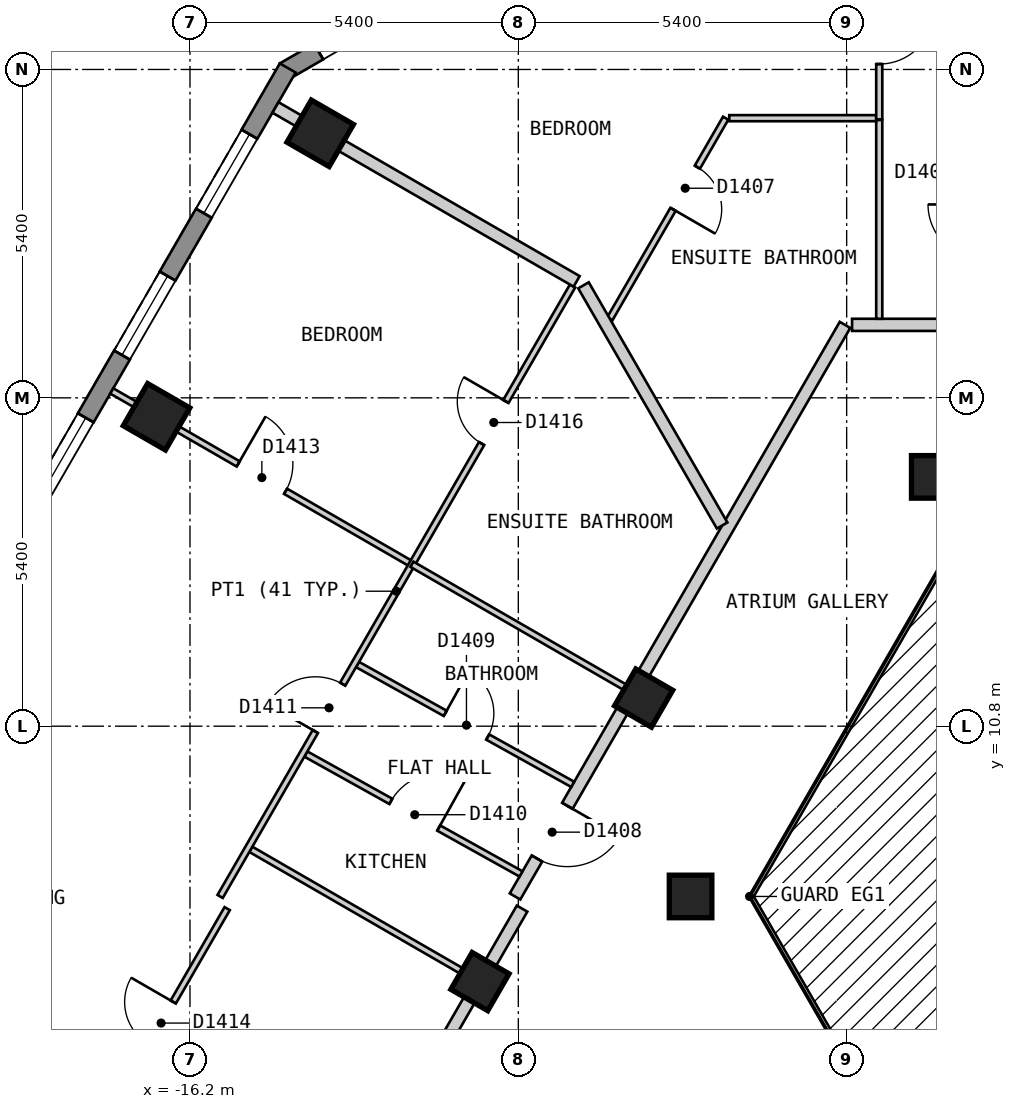
"""IFC4 building model, lengths in metres.
Left out: names, types, materials, properties, quantities, classifications, styles, units other than length and angle.
Written with IfcOpenShell. Run it as: python <this file> out.ifc"""

import sys

from ifc_helpers import new_model, si_unit, direction, frame, frame_2d, origin, origin_2d, place, context, subcontext, project, spatial, polyline, rectangle, outline, extrude, element, fill, save


model = new_model("IFC4")
c1 = context("Model", 3, precision=1e-05, world=origin(), true_north=direction((0.0, 1.0)))
c2 = subcontext(c1, "Body", "Model", "MODEL_VIEW")
j1 = project(units=[si_unit("LENGTHUNIT", "METRE"), si_unit("PLANEANGLEUNIT", "RADIAN")], contexts=[c1])
p1 = place(None, origin())
s1 = spatial("IfcSite", under=j1, at=p1, CompositionType="ELEMENT")
p2 = place(p1, origin())
s2 = spatial("IfcBuilding", under=s1, at=p2, CompositionType="ELEMENT")
p3 = place(p2, frame((0.0, 0.0, 166.2)))
s3 = spatial("IfcBuildingStorey", under=s2, at=p3, CompositionType="ELEMENT", Elevation=166.2)
for number, where, z_axis, x_axis in (
    (1, (-14.058, 20.55, 0.0), (0.0, 0.0, 1.0), (-0.5, -0.866, 0.0)),
    (2, (-16.75, 15.888, 0.0), (0.0, 0.0, 1.0), (-0.5, -0.866, 0.0)),
):
    element("IfcColumn", number, at=place(p3, frame(where, z_axis=z_axis, x_axis=x_axis)), inside=s3, PredefinedType="COLUMN", context=c2, shape_type="SweptSolid", body=[
        extrude(rectangle(XDim=0.8, YDim=0.8, at=origin_2d()), origin(), (0.0, 0.0, 1.0), 3.0),
    ])
for number, where, z_axis, x_axis in (
    (3, (-3.984, 14.9, 0.0), (0.0, 0.0, 1.0), (1.0, 0.0, 0.0)),
    (4, (-8.739, 11.263, 0.0), (0.0, 0.0, 1.0), (-0.5, -0.866, 0.0)),
    (5, (-7.967, 8.0, 0.0), (0.0, 0.0, 1.0), (1.0, 0.0, 0.0)),
    (6, (-11.431, 6.6, 0.0), (0.0, 0.0, 1.0), (-0.5, -0.866, 0.0)),
):
    element("IfcColumn", number, at=place(p3, frame(where, z_axis=z_axis, x_axis=x_axis)), inside=s3, PredefinedType="COLUMN", context=c2, shape_type="SweptSolid", body=[
        extrude(rectangle(XDim=0.7, YDim=0.7, at=origin_2d()), origin(), (0.0, 0.0, 1.0), 3.0),
    ])
p4 = place(p3, frame((-10.317, 24.07, 0.0), z_axis=(0.0, 0.0, 1.0), x_axis=(-0.866022959057, -0.500004234368, 0.0)))
e7 = element("IfcWall", 7, at=p4, inside=s3, PredefinedType="SOLIDWALL", context=c2, shape_type="SweptSolid", body=[
    extrude(outline(polyline([(0.0, -0.15), (5.0, -0.15), (4.92, 0.15), (0.08, 0.15), (0.0, -0.15)])), origin(), (0.0, 0.0, 1.0), 2.7),
])
p5 = place(p4, frame((0.65, 0.0, 0.15)))
e8 = element("IfcOpeningElement", 8, at=p5, cuts=e7, PredefinedType="OPENING", context=c2, shape_type="SweptSolid", body=[
    extrude(rectangle(XDim=1.2, YDim=2.1, at=frame_2d((0.6, 1.05))), frame((0.0, 0.16, 0.0), z_axis=(0.0, -1.0, 0.0), x_axis=(1.0, 0.0, 0.0)), (0.0, 0.0, 1.0), 0.32),
])
p6 = place(p4, frame((3.149, 0.0, 0.15)))
e9 = element("IfcOpeningElement", 9, at=p6, cuts=e7, PredefinedType="OPENING", context=c2, shape_type="SweptSolid", body=[
    extrude(rectangle(XDim=1.2, YDim=2.1, at=frame_2d((0.6, 1.05))), frame((0.0, 0.16, 0.0), z_axis=(0.0, -1.0, 0.0), x_axis=(1.0, 0.0, 0.0)), (0.0, 0.0, 1.0), 0.32),
])
p7 = place(p3, frame((-14.592, 21.625, 0.0), z_axis=(0.0, 0.0, 1.0), x_axis=(-0.500010537973, -0.866019319597, 0.0)))
e10 = element("IfcWall", 10, at=p7, inside=s3, PredefinedType="SOLIDWALL", context=c2, shape_type="SweptSolid", body=[
    extrude(outline(polyline([(0.0, -0.15), (22.863, -0.15), (22.783, 0.15), (0.08, 0.15), (0.0, -0.15)])), origin(), (0.0, 0.0, 1.0), 2.7),
])
p8 = place(p7, frame((1.259, 0.0, 0.15)))
e11 = element("IfcOpeningElement", 11, at=p8, cuts=e10, PredefinedType="OPENING", context=c2, shape_type="SweptSolid", body=[
    extrude(rectangle(XDim=1.5, YDim=2.1, at=frame_2d((0.75, 1.05))), frame((0.0, 0.16, 0.0), z_axis=(0.0, -1.0, 0.0), x_axis=(1.0, 0.0, 0.0)), (0.0, 0.0, 1.0), 0.32),
])
p9 = place(p7, frame((3.952, 0.0, 0.15)))
e12 = element("IfcOpeningElement", 12, at=p9, cuts=e10, PredefinedType="OPENING", context=c2, shape_type="SweptSolid", body=[
    extrude(rectangle(XDim=1.5, YDim=2.1, at=frame_2d((0.75, 1.05))), frame((0.0, 0.16, 0.0), z_axis=(0.0, -1.0, 0.0), x_axis=(1.0, 0.0, 0.0)), (0.0, 0.0, 1.0), 0.32),
])
p10 = place(p7, frame((6.644, 0.0, 0.15)))
e13 = element("IfcOpeningElement", 13, at=p10, cuts=e10, PredefinedType="OPENING", context=c2, shape_type="SweptSolid", body=[
    extrude(rectangle(XDim=1.5, YDim=2.1, at=frame_2d((0.75, 1.05))), frame((0.0, 0.16, 0.0), z_axis=(0.0, -1.0, 0.0), x_axis=(1.0, 0.0, 0.0)), (0.0, 0.0, 1.0), 0.32),
])
p11 = place(p7, frame((9.335, 0.0, 0.15)))
e14 = element("IfcOpeningElement", 14, at=p11, cuts=e10, PredefinedType="OPENING", context=c2, shape_type="SweptSolid", body=[
    extrude(rectangle(XDim=1.5, YDim=2.1, at=frame_2d((0.75, 1.05))), frame((0.0, 0.16, 0.0), z_axis=(0.0, -1.0, 0.0), x_axis=(1.0, 0.0, 0.0)), (0.0, 0.0, 1.0), 0.32),
])
p12 = place(p7, frame((12.028, 0.0, 0.15)))
e15 = element("IfcOpeningElement", 15, at=p12, cuts=e10, PredefinedType="OPENING", context=c2, shape_type="SweptSolid", body=[
    extrude(rectangle(XDim=1.5, YDim=2.1, at=frame_2d((0.75, 1.05))), frame((0.0, 0.16, 0.0), z_axis=(0.0, -1.0, 0.0), x_axis=(1.0, 0.0, 0.0)), (0.0, 0.0, 1.0), 0.32),
])
p13 = place(p7, frame((14.72, 0.0, 0.15)))
e16 = element("IfcOpeningElement", 16, at=p13, cuts=e10, PredefinedType="OPENING", context=c2, shape_type="SweptSolid", body=[
    extrude(rectangle(XDim=1.5, YDim=2.1, at=frame_2d((0.75, 1.05))), frame((0.0, 0.16, 0.0), z_axis=(0.0, -1.0, 0.0), x_axis=(1.0, 0.0, 0.0)), (0.0, 0.0, 1.0), 0.32),
])
p14 = place(p7, frame((17.411, 0.0, 0.15)))
e17 = element("IfcOpeningElement", 17, at=p14, cuts=e10, PredefinedType="OPENING", context=c2, shape_type="SweptSolid", body=[
    extrude(rectangle(XDim=1.5, YDim=2.1, at=frame_2d((0.75, 1.05))), frame((0.0, 0.16, 0.0), z_axis=(0.0, -1.0, 0.0), x_axis=(1.0, 0.0, 0.0)), (0.0, 0.0, 1.0), 0.32),
])
p15 = place(p7, frame((20.104, 0.0, 0.15)))
e18 = element("IfcOpeningElement", 18, at=p15, cuts=e10, PredefinedType="OPENING", context=c2, shape_type="SweptSolid", body=[
    extrude(rectangle(XDim=1.5, YDim=2.1, at=frame_2d((0.75, 1.05))), frame((0.0, 0.16, 0.0), z_axis=(0.0, -1.0, 0.0), x_axis=(1.0, 0.0, 0.0)), (0.0, 0.0, 1.0), 0.32),
])
p16 = place(p3, frame((-5.311, 17.4, 0.0), z_axis=(0.0, 0.0, 1.0), x_axis=(1.0, 0.0, 0.0)))
e19 = element("IfcWall", 19, at=p16, inside=s3, PredefinedType="PARTITIONING", context=c2, shape_type="SweptSolid", body=[
    extrude(rectangle(XDim=10.075, YDim=0.2, at=frame_2d((5.038, 0.0))), origin(), (0.0, 0.0, 1.0), 2.7),
])
p17 = place(p16, frame((2.429, 0.0, 0.0)))
e20 = element("IfcOpeningElement", 20, at=p17, cuts=e19, PredefinedType="OPENING", context=c2, shape_type="SweptSolid", body=[
    extrude(rectangle(XDim=0.9, YDim=2.1, at=frame_2d((0.45, 1.05))), frame((0.0, 0.11, 0.0), z_axis=(0.0, -1.0, 0.0), x_axis=(1.0, 0.0, 0.0)), (0.0, 0.0, 1.0), 0.22),
])
p18 = place(p3, frame((-15.53, -0.501, 0.0), z_axis=(0.0, 0.0, 1.0), x_axis=(0.499952498232, 0.866052827206, 0.0)))
e21 = element("IfcWall", 21, at=p18, inside=s3, PredefinedType="PARTITIONING", context=c2, shape_type="SweptSolid", body=[
    extrude(rectangle(XDim=9.585, YDim=0.2, at=frame_2d((4.792, 0.0))), origin(), (0.0, 0.0, 1.0), 2.7),
])
p19 = place(p3, frame((-10.854, 8.0, 0.0), z_axis=(0.0, 0.0, 1.0), x_axis=(0.499997637144, 0.866026767976, 0.0)))
e22 = element("IfcWall", 22, at=p19, inside=s3, PredefinedType="PARTITIONING", context=c2, shape_type="SweptSolid", body=[
    extrude(rectangle(XDim=10.854, YDim=0.2, at=frame_2d((5.427, 0.0))), origin(), (0.0, 0.0, 1.0), 2.7),
])
p20 = place(p19, frame((0.721, 0.0, 0.0)))
e23 = element("IfcOpeningElement", 23, at=p20, cuts=e22, PredefinedType="OPENING", context=c2, shape_type="SweptSolid", body=[
    extrude(rectangle(XDim=1.0, YDim=2.1, at=frame_2d((0.5, 1.05))), frame((0.0, 0.11, 0.0), z_axis=(0.0, -1.0, 0.0), x_axis=(1.0, 0.0, 0.0)), (0.0, 0.0, 1.0), 0.22),
])
p21 = place(p3, frame((-4.864, 20.769, 0.0), z_axis=(0.0, 0.0, 1.0), x_axis=(0.0, -1.0, 0.0)))
e24 = element("IfcWall", 24, at=p21, inside=s3, PredefinedType="PARTITIONING", context=c2, shape_type="SweptSolid", body=[
    extrude(rectangle(XDim=3.269, YDim=0.1, at=frame_2d((1.635, 0.0))), origin(), (0.0, 0.0, 1.0), 2.7),
])
p22 = place(p3, frame((-13.444, 11.814, 0.0), z_axis=(0.0, 0.0, 1.0), x_axis=(0.873653620945, -0.486548405207, 0.0)))
e25 = element("IfcWall", 25, at=p22, inside=s3, PredefinedType="PARTITIONING", context=c2, shape_type="SweptSolid", body=[
    extrude(rectangle(XDim=4.051, YDim=0.1, at=frame_2d((2.025, 0.0))), origin(), (0.0, 0.0, 1.0), 2.7),
])
p23 = place(p22, frame((1.65, 0.0, 0.0)))
e26 = element("IfcOpeningElement", 26, at=p23, cuts=e25, PredefinedType="OPENING", context=c2, shape_type="SweptSolid", body=[
    extrude(rectangle(XDim=0.8, YDim=2.1, at=frame_2d((0.4, 1.05))), frame((0.0, 0.06, 0.0), z_axis=(0.0, -1.0, 0.0), x_axis=(1.0, 0.0, 0.0)), (0.0, 0.0, 1.0), 0.12),
])
p24 = place(p3, frame((-14.294, 10.342, 0.0), z_axis=(0.0, 0.0, 1.0), x_axis=(0.873582256032, -0.486676527013, 0.0)))
e27 = element("IfcWall", 27, at=p24, inside=s3, PredefinedType="PARTITIONING", context=c2, shape_type="SweptSolid", body=[
    extrude(rectangle(XDim=4.05, YDim=0.1, at=frame_2d((2.025, 0.0))), origin(), (0.0, 0.0, 1.0), 2.7),
])
p25 = place(p24, frame((1.6, 0.0, 0.0)))
e28 = element("IfcOpeningElement", 28, at=p25, cuts=e27, PredefinedType="OPENING", context=c2, shape_type="SweptSolid", body=[
    extrude(rectangle(XDim=0.9, YDim=2.1, at=frame_2d((0.45, 1.05))), frame((0.0, 0.06, 0.0), z_axis=(0.0, -1.0, 0.0), x_axis=(1.0, 0.0, 0.0)), (0.0, 0.0, 1.0), 0.12),
])
p26 = place(p3, frame((-22.87, 6.987, 0.0), z_axis=(0.0, 0.0, 1.0), x_axis=(0.866022959057, -0.500004234368, 0.0)))
e29 = element("IfcWall", 29, at=p26, inside=s3, PredefinedType="PARTITIONING", context=c2, shape_type="SweptSolid", body=[
    extrude(rectangle(XDim=10.0, YDim=0.1, at=frame_2d((5.0, 0.0))), origin(), (0.0, 0.0, 1.0), 2.7),
])
p27 = place(p26, frame((2.5, 0.0, 0.0)))
e30 = element("IfcOpeningElement", 30, at=p27, cuts=e29, PredefinedType="OPENING", context=c2, shape_type="SweptSolid", body=[
    extrude(rectangle(XDim=0.9, YDim=2.1, at=frame_2d((0.45, 1.05))), frame((0.0, 0.06, 0.0), z_axis=(0.0, -1.0, 0.0), x_axis=(1.0, 0.0, 0.0)), (0.0, 0.0, 1.0), 0.12),
])
p28 = place(p3, frame((-15.199, 8.775, 0.0), z_axis=(0.0, 0.0, 1.0), x_axis=(0.866043063166, -0.499969411806, 0.0)))
e31 = element("IfcWall", 31, at=p28, inside=s3, PredefinedType="PARTITIONING", context=c2, shape_type="SweptSolid", body=[
    extrude(rectangle(XDim=4.25, YDim=0.1, at=frame_2d((2.125, 0.0))), origin(), (0.0, 0.0, 1.0), 2.7),
])
p29 = place(p3, frame((-17.486, 16.313, 0.0), z_axis=(0.0, 0.0, 1.0), x_axis=(0.866004402611, -0.500036373335, 0.0)))
e32 = element("IfcWall", 32, at=p29, inside=s3, PredefinedType="PARTITIONING", context=c2, shape_type="SweptSolid", body=[
    extrude(rectangle(XDim=5.7, YDim=0.1, at=frame_2d((2.85, 0.0))), origin(), (0.0, 0.0, 1.0), 2.7),
])
p30 = place(p29, frame((2.4, 0.0, 0.0)))
e33 = element("IfcOpeningElement", 33, at=p30, cuts=e32, PredefinedType="OPENING", context=c2, shape_type="SweptSolid", body=[
    extrude(rectangle(XDim=0.9, YDim=2.1, at=frame_2d((0.45, 1.05))), frame((0.0, 0.06, 0.0), z_axis=(0.0, -1.0, 0.0), x_axis=(1.0, 0.0, 0.0)), (0.0, 0.0, 1.0), 0.12),
])
p31 = place(p3, frame((-7.331, 20.799, 0.0), z_axis=(0.0, 0.0, 1.0), x_axis=(1.0, 0.0, 0.0)))
e34 = element("IfcWall", 34, at=p31, inside=s3, PredefinedType="PARTITIONING", context=c2, shape_type="SweptSolid", body=[
    extrude(rectangle(XDim=2.417, YDim=0.1, at=frame_2d((1.208, 0.0))), origin(), (0.0, 0.0, 1.0), 2.7),
])
p32 = place(p3, frame((-9.295, 17.5, 0.0), z_axis=(0.0, 0.0, 1.0), x_axis=(0.500060839138, 0.865990275442, 0.0)))
e35 = element("IfcWall", 35, at=p32, inside=s3, PredefinedType="PARTITIONING", context=c2, shape_type="SweptSolid", body=[
    extrude(rectangle(XDim=3.81, YDim=0.1, at=frame_2d((1.905, 0.0))), origin(), (0.0, 0.0, 1.0), 2.7),
])
p33 = place(p32, frame((2.079, 0.0, 0.0)))
e36 = element("IfcOpeningElement", 36, at=p33, cuts=e35, PredefinedType="OPENING", context=c2, shape_type="SweptSolid", body=[
    extrude(rectangle(XDim=0.8, YDim=2.1, at=frame_2d((0.4, 1.05))), frame((0.0, 0.06, 0.0), z_axis=(0.0, -1.0, 0.0), x_axis=(1.0, 0.0, 0.0)), (0.0, 0.0, 1.0), 0.12),
])
p34 = place(p3, frame((-15.704, 8.0, 0.0), z_axis=(0.0, 0.0, 1.0), x_axis=(0.500005637941, 0.866022148693, 0.0)))
e37 = element("IfcWall", 37, at=p34, inside=s3, PredefinedType="PARTITIONING", context=c2, shape_type="SweptSolid", body=[
    extrude(rectangle(XDim=11.592, YDim=0.1, at=frame_2d((5.796, 0.0))), origin(), (0.0, 0.0, 1.0), 2.7),
])
p35 = place(p34, frame((3.132, 0.0, 0.0)))
e38 = element("IfcOpeningElement", 38, at=p35, cuts=e37, PredefinedType="OPENING", context=c2, shape_type="SweptSolid", body=[
    extrude(rectangle(XDim=0.9, YDim=2.1, at=frame_2d((0.45, 1.05))), frame((0.0, 0.06, 0.0), z_axis=(0.0, -1.0, 0.0), x_axis=(1.0, 0.0, 0.0)), (0.0, 0.0, 1.0), 0.12),
])
p36 = place(p34, frame((8.6, 0.0, 0.0)))
e39 = element("IfcOpeningElement", 39, at=p36, cuts=e37, PredefinedType="OPENING", context=c2, shape_type="SweptSolid", body=[
    extrude(rectangle(XDim=0.8, YDim=2.1, at=frame_2d((0.4, 1.05))), frame((0.0, 0.06, 0.0), z_axis=(0.0, -1.0, 0.0), x_axis=(1.0, 0.0, 0.0)), (0.0, 0.0, 1.0), 0.12),
])
p37 = place(p3, frame((-4.864, 20.779, 0.0), z_axis=(0.0, 0.0, 1.0), x_axis=(0.0, 1.0, 0.0)))
e40 = element("IfcWall", 40, at=p37, inside=s3, PredefinedType="PARTITIONING", context=c2, shape_type="SweptSolid", body=[
    extrude(rectangle(XDim=3.121, YDim=0.1, at=frame_2d((1.561, 0.0))), origin(), (0.0, 0.0, 1.0), 2.7),
])
p38 = place(p37, frame((0.91, 0.0, 0.0)))
e41 = element("IfcOpeningElement", 41, at=p38, cuts=e40, PredefinedType="OPENING", context=c2, shape_type="SweptSolid", body=[
    extrude(rectangle(XDim=0.9, YDim=2.1, at=frame_2d((0.45, 1.05))), frame((0.0, 0.06, 0.0), z_axis=(0.0, -1.0, 0.0), x_axis=(1.0, 0.0, 0.0)), (0.0, 0.0, 1.0), 0.12),
])
p39 = place(p3, frame((-9.728, 18.05, 0.0), z_axis=(0.0, 0.0, 1.0), x_axis=(0.499921709333, -0.866070600204, 0.0)))
e42 = element("IfcWall", 42, at=p39, inside=s3, PredefinedType="PARTITIONING", context=c2, shape_type="SweptSolid", body=[
    extrude(rectangle(XDim=4.561, YDim=0.2, at=frame_2d((2.28, 0.0))), origin(), (0.0, 0.0, 1.0), 2.7),
])
p40 = place(p3, frame((-14.794, 20.975, 0.0), z_axis=(0.0, 0.0, 1.0), x_axis=(0.865982978614, -0.500073475352, 0.0)))
e43 = element("IfcWall", 43, at=p40, inside=s3, PredefinedType="PARTITIONING", context=c2, shape_type="SweptSolid", body=[
    extrude(rectangle(XDim=5.719, YDim=0.2, at=frame_2d((2.86, 0.0))), origin(), (0.0, 0.0, 1.0), 2.7),
])
p41 = place(p3, frame((-17.761, 4.037, 0.0), z_axis=(0.0, 0.0, 1.0), x_axis=(0.50009692756, 0.865969435399, 0.0)))
e44 = element("IfcWall", 44, at=p41, inside=s3, PredefinedType="PARTITIONING", context=c2, shape_type="SweptSolid", body=[
    extrude(rectangle(XDim=4.345, YDim=0.1, at=frame_2d((2.173, 0.0))), origin(), (0.0, 0.0, 1.0), 2.7),
])
p42 = place(p41, frame((1.772, 0.0, 0.0)))
e45 = element("IfcOpeningElement", 45, at=p42, cuts=e44, PredefinedType="OPENING", context=c2, shape_type="SweptSolid", body=[
    extrude(rectangle(XDim=0.8, YDim=2.1, at=frame_2d((0.4, 1.05))), frame((0.0, 0.06, 0.0), z_axis=(0.0, -1.0, 0.0), x_axis=(1.0, 0.0, 0.0)), (0.0, 0.0, 1.0), 0.12),
])
p43 = place(p3, frame((-12.55, 13.463, 0.0), z_axis=(0.0, 0.0, 1.0), x_axis=(0.86606561423, -0.499930346997, 0.0)))
e46 = element("IfcWall", 46, at=p43, inside=s3, PredefinedType="PARTITIONING", context=c2, shape_type="SweptSolid", body=[
    extrude(rectangle(XDim=4.1, YDim=0.1, at=frame_2d((2.05, 0.0))), origin(), (0.0, 0.0, 1.0), 2.7),
])
p44 = place(p6, origin())
e47 = element("IfcWindow", 47, at=p44, inside=s3, PartitioningType="SINGLE_PANEL", PredefinedType="WINDOW", context=c2, shape_type="SweptSolid", body=[
    extrude(rectangle(XDim=1.2, YDim=2.1, at=frame_2d((0.6, 1.05))), frame((0.0, 0.03, 0.0), z_axis=(0.0, -1.0, 0.0), x_axis=(1.0, 0.0, 0.0)), (0.0, 0.0, 1.0), 0.06),
])
fill(e9, e47)
p45 = place(p8, origin())
e48 = element("IfcWindow", 48, at=p45, inside=s3, PartitioningType="SINGLE_PANEL", PredefinedType="WINDOW", context=c2, shape_type="SweptSolid", body=[
    extrude(rectangle(XDim=1.5, YDim=2.1, at=frame_2d((0.75, 1.05))), frame((0.0, 0.03, 0.0), z_axis=(0.0, -1.0, 0.0), x_axis=(1.0, 0.0, 0.0)), (0.0, 0.0, 1.0), 0.06),
])
fill(e11, e48)
p46 = place(p9, origin())
e49 = element("IfcWindow", 49, at=p46, inside=s3, PartitioningType="SINGLE_PANEL", PredefinedType="WINDOW", context=c2, shape_type="SweptSolid", body=[
    extrude(rectangle(XDim=1.5, YDim=2.1, at=frame_2d((0.75, 1.05))), frame((0.0, 0.03, 0.0), z_axis=(0.0, -1.0, 0.0), x_axis=(1.0, 0.0, 0.0)), (0.0, 0.0, 1.0), 0.06),
])
fill(e12, e49)
p47 = place(p10, origin())
e50 = element("IfcWindow", 50, at=p47, inside=s3, PartitioningType="SINGLE_PANEL", PredefinedType="WINDOW", context=c2, shape_type="SweptSolid", body=[
    extrude(rectangle(XDim=1.5, YDim=2.1, at=frame_2d((0.75, 1.05))), frame((0.0, 0.03, 0.0), z_axis=(0.0, -1.0, 0.0), x_axis=(1.0, 0.0, 0.0)), (0.0, 0.0, 1.0), 0.06),
])
fill(e13, e50)
p48 = place(p38, origin())
e51 = element("IfcDoor", 51, at=p48, inside=s3, OperationType="SINGLE_SWING_RIGHT", PredefinedType="DOOR", context=c2, shape_type="SweptSolid", body=[
    extrude(rectangle(XDim=0.9, YDim=2.1, at=frame_2d((0.45, 1.05))), frame((0.0, 0.025, 0.0), z_axis=(0.0, -1.0, 0.0), x_axis=(1.0, 0.0, 0.0)), (0.0, 0.0, 1.0), 0.05),
])
fill(e41, e51)
p49 = place(p33, origin())
e52 = element("IfcDoor", 52, at=p49, inside=s3, OperationType="SINGLE_SWING_LEFT", PredefinedType="DOOR", context=c2, shape_type="SweptSolid", body=[
    extrude(rectangle(XDim=0.8, YDim=2.1, at=frame_2d((0.4, 1.05))), frame((0.0, 0.025, 0.0), z_axis=(0.0, -1.0, 0.0), x_axis=(1.0, 0.0, 0.0)), (0.0, 0.0, 1.0), 0.05),
])
fill(e36, e52)
p50 = place(p20, origin())
e53 = element("IfcDoor", 53, at=p50, inside=s3, OperationType="SINGLE_SWING_RIGHT", PredefinedType="DOOR", context=c2, shape_type="SweptSolid", body=[
    extrude(rectangle(XDim=1.0, YDim=2.1, at=frame_2d((0.5, 1.05))), frame((0.0, 0.025, 0.0), z_axis=(0.0, -1.0, 0.0), x_axis=(1.0, 0.0, 0.0)), (0.0, 0.0, 1.0), 0.05),
])
fill(e23, e53)
p51 = place(p23, origin())
e54 = element("IfcDoor", 54, at=p51, inside=s3, OperationType="SINGLE_SWING_LEFT", PredefinedType="DOOR", context=c2, shape_type="SweptSolid", body=[
    extrude(rectangle(XDim=0.8, YDim=2.1, at=frame_2d((0.4, 1.05))), frame((0.0, 0.025, 0.0), z_axis=(0.0, -1.0, 0.0), x_axis=(1.0, 0.0, 0.0)), (0.0, 0.0, 1.0), 0.05),
])
fill(e26, e54)
p52 = place(p25, origin())
e55 = element("IfcDoor", 55, at=p52, inside=s3, OperationType="SINGLE_SWING_RIGHT", PredefinedType="DOOR", context=c2, shape_type="SweptSolid", body=[
    extrude(rectangle(XDim=0.9, YDim=2.1, at=frame_2d((0.45, 1.05))), frame((0.0, 0.025, 0.0), z_axis=(0.0, -1.0, 0.0), x_axis=(1.0, 0.0, 0.0)), (0.0, 0.0, 1.0), 0.05),
])
fill(e28, e55)
p53 = place(p35, origin())
e56 = element("IfcDoor", 56, at=p53, inside=s3, OperationType="SINGLE_SWING_LEFT", PredefinedType="DOOR", context=c2, shape_type="SweptSolid", body=[
    extrude(rectangle(XDim=0.9, YDim=2.1, at=frame_2d((0.45, 1.05))), frame((0.0, 0.025, 0.0), z_axis=(0.0, -1.0, 0.0), x_axis=(1.0, 0.0, 0.0)), (0.0, 0.0, 1.0), 0.05),
])
fill(e38, e56)
p54 = place(p30, origin())
e57 = element("IfcDoor", 57, at=p54, inside=s3, OperationType="SINGLE_SWING_LEFT", PredefinedType="DOOR", context=c2, shape_type="SweptSolid", body=[
    extrude(rectangle(XDim=0.9, YDim=2.1, at=frame_2d((0.45, 1.05))), frame((0.0, 0.025, 0.0), z_axis=(0.0, -1.0, 0.0), x_axis=(1.0, 0.0, 0.0)), (0.0, 0.0, 1.0), 0.05),
])
fill(e33, e57)
p55 = place(p42, origin())
e58 = element("IfcDoor", 58, at=p55, inside=s3, OperationType="SINGLE_SWING_RIGHT", PredefinedType="DOOR", context=c2, shape_type="SweptSolid", body=[
    extrude(rectangle(XDim=0.8, YDim=2.1, at=frame_2d((0.4, 1.05))), frame((0.0, 0.025, 0.0), z_axis=(0.0, -1.0, 0.0), x_axis=(1.0, 0.0, 0.0)), (0.0, 0.0, 1.0), 0.05),
])
fill(e45, e58)
p56 = place(p36, origin())
e59 = element("IfcDoor", 59, at=p56, inside=s3, OperationType="SINGLE_SWING_RIGHT", PredefinedType="DOOR", context=c2, shape_type="SweptSolid", body=[
    extrude(rectangle(XDim=0.8, YDim=2.1, at=frame_2d((0.4, 1.05))), frame((0.0, 0.025, 0.0), z_axis=(0.0, -1.0, 0.0), x_axis=(1.0, 0.0, 0.0)), (0.0, 0.0, 1.0), 0.05),
])
fill(e39, e59)
save(model, sys.argv[1])
